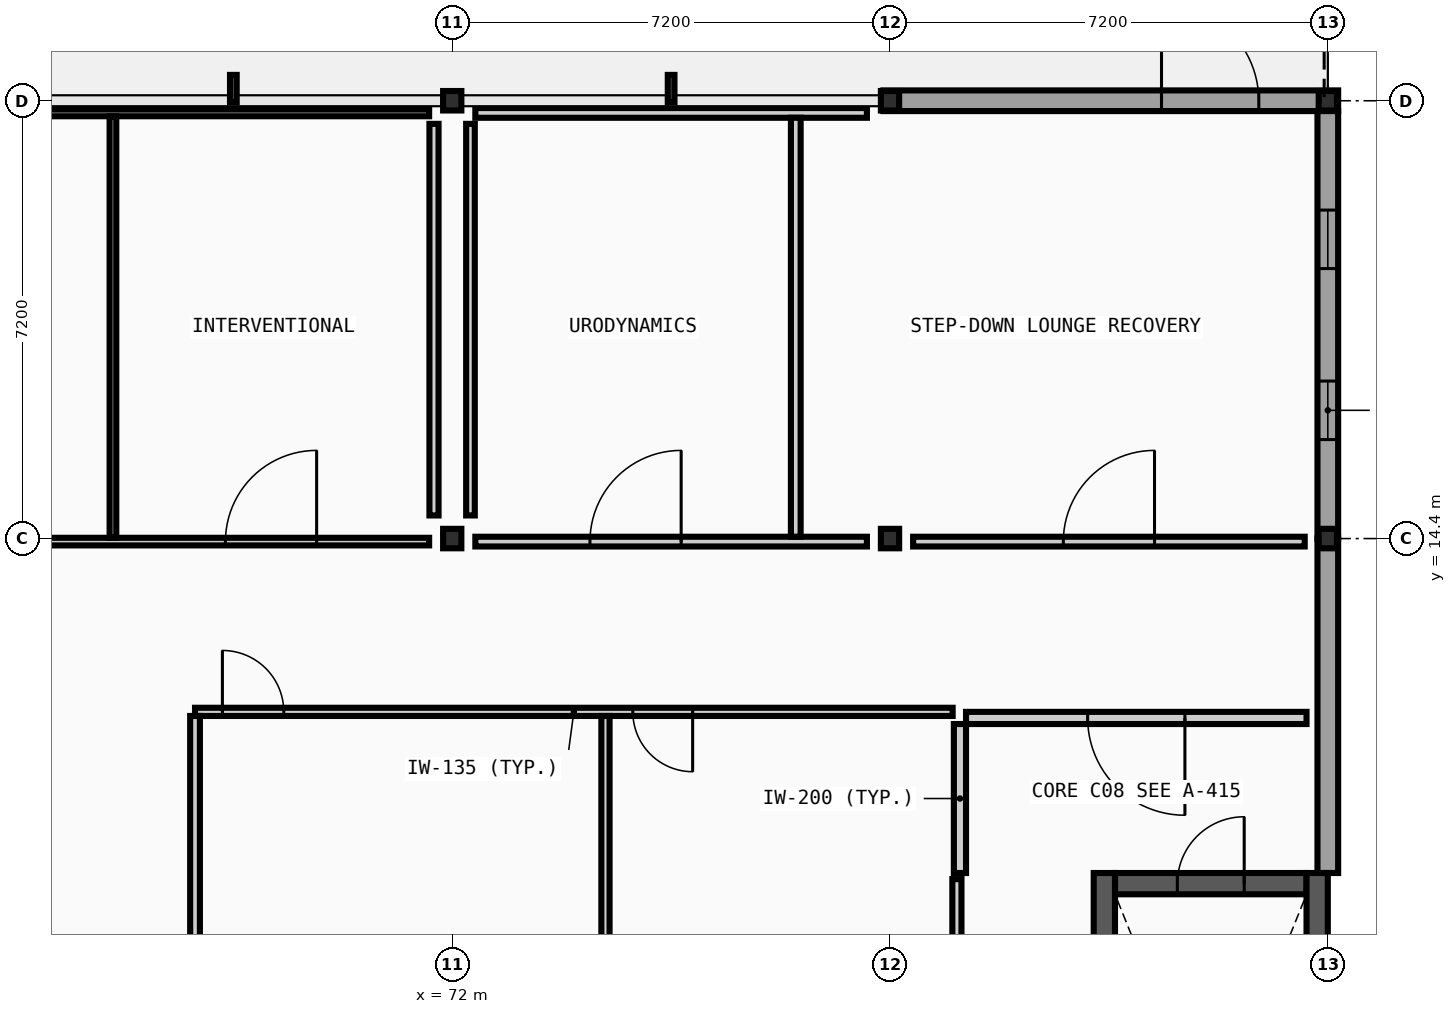
"""IFC4 building model, lengths in metres.
Left out: names, types, materials, properties, quantities, classifications, styles, units other than length and angle.
Written with IfcOpenShell. Run it as: python <this file> out.ifc"""

import sys

from ifc_helpers import new_model, si_unit, direction, frame, frame_2d, origin, origin_2d, place, context, subcontext, project, spatial, rectangle, i_section, extrude, element, fill, save


model = new_model("IFC4")
c1 = context("Model", 3, precision=1e-05, world=origin(), true_north=direction((0.0, 1.0)))
c2 = subcontext(c1, "Body", "Model", "MODEL_VIEW")
j1 = project(units=[si_unit("LENGTHUNIT", "METRE"), si_unit("PLANEANGLEUNIT", "RADIAN")], contexts=[c1])
p1 = place(None, origin())
s1 = spatial("IfcSite", under=j1, at=p1, CompositionType="ELEMENT")
p2 = place(p1, origin())
s2 = spatial("IfcBuilding", under=s1, at=p2, CompositionType="ELEMENT")
p3 = place(p2, frame((0.0, 0.0, 14.0)))
s3 = spatial("IfcBuildingStorey", under=s2, at=p3, CompositionType="ELEMENT", Elevation=14.0)
for number, where, z_axis, x_axis in (
    (1, (72.0, 14.4, 0.0), (0.0, 0.0, 1.0), (1.0, 0.0, 0.0)),
    (2, (72.0, 21.6, 0.0), (0.0, 0.0, 1.0), (1.0, 0.0, 0.0)),
    (3, (79.2, 14.4, 0.0), (0.0, 0.0, 1.0), (1.0, 0.0, 0.0)),
    (4, (79.2, 21.6, 0.0), (0.0, 0.0, 1.0), (1.0, 0.0, 0.0)),
    (5, (86.4, 14.4, 0.0), (0.0, 0.0, 1.0), (1.0, 0.0, 0.0)),
    (6, (86.4, 21.6, 0.0), (0.0, 0.0, 1.0), (1.0, 0.0, 0.0)),
):
    element("IfcColumn", number, at=place(p3, frame(where, z_axis=z_axis, x_axis=x_axis)), inside=s3, PredefinedType="COLUMN", context=c2, shape_type="SweptSolid", body=[
        extrude(i_section(OverallWidth=0.3, OverallDepth=0.32, WebThickness=0.011, FlangeThickness=0.021, FilletRadius=0.027, at=origin_2d()), origin(), (0.0, 0.0, 1.0), 4.4),
    ])
p4 = place(p3, frame((86.57, 21.6, 0.0), z_axis=(0.0, 0.0, 1.0), x_axis=(-1.0, 0.0, 0.0)))
e7 = element("IfcWall", 7, at=p4, inside=s3, PredefinedType="STANDARD", context=c2, shape_type="SweptSolid", body=[
    extrude(rectangle(XDim=7.48, YDim=0.34, at=frame_2d((3.74, 0.0))), origin(), (0.0, 0.0, 1.0), 3.935),
])
p5 = place(p4, frame((1.305, 0.0, 0.0)))
e8 = element("IfcOpeningElement", 8, at=p5, cuts=e7, PredefinedType="OPENING", context=c2, shape_type="SweptSolid", body=[
    extrude(rectangle(XDim=1.6, YDim=2.2, at=frame_2d((0.8, 1.1))), frame((0.0, 0.18, 0.0), z_axis=(0.0, -1.0, 0.0), x_axis=(1.0, 0.0, 0.0)), (0.0, 0.0, 1.0), 0.36),
])
p6 = place(p3, frame((86.4, 8.9, 0.0), z_axis=(0.0, 0.0, 1.0), x_axis=(0.0, 1.0, 0.0)))
e9 = element("IfcWall", 9, at=p6, inside=s3, PredefinedType="STANDARD", context=c2, shape_type="SweptSolid", body=[
    extrude(rectangle(XDim=5.5, YDim=0.34, at=frame_2d((2.75, 0.0))), origin(), (0.0, 0.0, 1.0), 4.2),
])
p7 = place(p3, frame((86.4, 14.4, 0.0), z_axis=(0.0, 0.0, 1.0), x_axis=(0.0, 1.0, 0.0)))
e10 = element("IfcWall", 10, at=p7, inside=s3, PredefinedType="STANDARD", context=c2, shape_type="SweptSolid", body=[
    extrude(rectangle(XDim=7.03, YDim=0.34, at=frame_2d((3.515, 0.0))), origin(), (0.0, 0.0, 1.0), 3.885),
])
p8 = place(p7, frame((1.628, 0.0, 0.95)))
e11 = element("IfcOpeningElement", 11, at=p8, cuts=e10, PredefinedType="OPENING", context=c2, shape_type="SweptSolid", body=[
    extrude(rectangle(XDim=0.962, YDim=1.368, at=frame_2d((0.481, 0.684))), frame((0.0, 0.18, 0.0), z_axis=(0.0, -1.0, 0.0), x_axis=(1.0, 0.0, 0.0)), (0.0, 0.0, 1.0), 0.36),
])
p9 = place(p7, frame((4.44, 0.0, 0.95)))
e12 = element("IfcOpeningElement", 12, at=p9, cuts=e10, PredefinedType="OPENING", context=c2, shape_type="SweptSolid", body=[
    extrude(rectangle(XDim=0.962, YDim=1.368, at=frame_2d((0.481, 0.684))), frame((0.0, 0.18, 0.0), z_axis=(0.0, -1.0, 0.0), x_axis=(1.0, 0.0, 0.0)), (0.0, 0.0, 1.0), 0.36),
])
p10 = place(p3, frame((82.9, 8.725, 0.0), z_axis=(0.0, 0.0, 1.0), x_axis=(1.0, 0.0, 0.0)))
e13 = element("IfcWall", 13, at=p10, inside=s3, PredefinedType="SHEAR", context=c2, shape_type="SweptSolid", body=[
    extrude(rectangle(XDim=3.15, YDim=0.35, at=frame_2d((1.575, 0.0))), origin(), (0.0, 0.0, 1.0), 4.2),
])
p11 = place(p10, frame((1.025, 0.0, 0.0)))
e14 = element("IfcOpeningElement", 14, at=p11, cuts=e13, PredefinedType="OPENING", context=c2, shape_type="SweptSolid", body=[
    extrude(rectangle(XDim=1.1, YDim=2.15, at=frame_2d((0.55, 1.075))), frame((0.0, 0.185, 0.0), z_axis=(0.0, -1.0, 0.0), x_axis=(1.0, 0.0, 0.0)), (0.0, 0.0, 1.0), 0.37),
])
for number, where, z_axis, x_axis in (
    (15, (82.725, 0.17, 0.0), (0.0, 0.0, 1.0), (0.0, 1.0, 0.0)),
    (16, (86.225, 0.17, 0.0), (0.0, 0.0, 1.0), (0.0, 1.0, 0.0)),
):
    element("IfcWall", number, at=place(p3, frame(where, z_axis=z_axis, x_axis=x_axis)), inside=s3, PredefinedType="SHEAR", context=c2, shape_type="SweptSolid", body=[
        extrude(rectangle(XDim=8.73, YDim=0.35, at=frame_2d((4.365, 0.0))), origin(), (0.0, 0.0, 1.0), 4.2),
    ])
p12 = place(p3, frame((80.45, 11.45, 0.0), z_axis=(0.0, 0.0, 1.0), x_axis=(1.0, 0.0, 0.0)))
e17 = element("IfcWall", 17, at=p12, inside=s3, PredefinedType="PARTITIONING", context=c2, shape_type="SweptSolid", body=[
    extrude(rectangle(XDim=5.6, YDim=0.2, at=frame_2d((2.8, 0.0))), origin(), (0.0, 0.0, 1.0), 4.2),
])
p13 = place(p12, frame((2.0, 0.0, 0.0)))
e18 = element("IfcOpeningElement", 18, at=p13, cuts=e17, PredefinedType="OPENING", context=c2, shape_type="SweptSolid", body=[
    extrude(rectangle(XDim=1.6, YDim=2.2, at=frame_2d((0.8, 1.1))), frame((0.0, 0.11, 0.0), z_axis=(0.0, -1.0, 0.0), x_axis=(1.0, 0.0, 0.0)), (0.0, 0.0, 1.0), 0.22),
])
p14 = place(p3, frame((80.35, 8.9, 0.0), z_axis=(0.0, 0.0, 1.0), x_axis=(0.0, 1.0, 0.0)))
e19 = element("IfcWall", 19, at=p14, inside=s3, PredefinedType="PARTITIONING", context=c2, shape_type="SweptSolid", body=[
    extrude(rectangle(XDim=2.45, YDim=0.2, at=frame_2d((1.225, 0.0))), origin(), (0.0, 0.0, 1.0), 4.2),
])
p15 = place(p3, frame((67.77, 11.55, 0.0), z_axis=(0.0, 0.0, 1.0), x_axis=(1.0, 0.0, 0.0)))
e20 = element("IfcWall", 20, at=p15, inside=s3, PredefinedType="PARTITIONING", context=c2, shape_type="SweptSolid", body=[
    extrude(rectangle(XDim=12.46, YDim=0.135, at=frame_2d((6.23, 0.0))), origin(), (0.0, 0.0, 1.0), 4.2),
])
p16 = place(p15, frame((7.2, 0.0, 0.0)))
e21 = element("IfcOpeningElement", 21, at=p16, cuts=e20, PredefinedType="OPENING", context=c2, shape_type="SweptSolid", body=[
    extrude(rectangle(XDim=0.984, YDim=2.04, at=frame_2d((0.492, 1.02))), frame((0.0, 0.078, 0.0), z_axis=(0.0, -1.0, 0.0), x_axis=(1.0, 0.0, 0.0)), (0.0, 0.0, 1.0), 0.155),
])
p17 = place(p15, frame((0.45, 0.0, 0.0)))
e22 = element("IfcOpeningElement", 22, at=p17, cuts=e20, PredefinedType="OPENING", context=c2, shape_type="SweptSolid", body=[
    extrude(rectangle(XDim=1.01, YDim=2.04, at=frame_2d((0.505, 1.02))), frame((0.0, 0.078, 0.0), z_axis=(0.0, -1.0, 0.0), x_axis=(1.0, 0.0, 0.0)), (0.0, 0.0, 1.0), 0.155),
])
p18 = place(p3, frame((65.18, 14.35, 0.0), z_axis=(0.0, 0.0, 1.0), x_axis=(1.0, 0.0, 0.0)))
e23 = element("IfcWall", 23, at=p18, inside=s3, PredefinedType="PARTITIONING", context=c2, shape_type="SweptSolid", body=[
    extrude(rectangle(XDim=6.44, YDim=0.125, at=frame_2d((3.22, 0.0))), origin(), (0.0, 0.0, 1.0), 3.935),
])
p19 = place(p18, frame((3.09, 0.0, 0.0)))
e24 = element("IfcOpeningElement", 24, at=p19, cuts=e23, PredefinedType="OPENING", context=c2, shape_type="SweptSolid", body=[
    extrude(rectangle(XDim=1.5, YDim=2.2, at=frame_2d((0.75, 1.1))), frame((0.0, 0.073, 0.0), z_axis=(0.0, -1.0, 0.0), x_axis=(1.0, 0.0, 0.0)), (0.0, 0.0, 1.0), 0.145),
])
p20 = place(p3, frame((72.38, 14.35, 0.0), z_axis=(0.0, 0.0, 1.0), x_axis=(1.0, 0.0, 0.0)))
e25 = element("IfcWall", 25, at=p20, inside=s3, PredefinedType="PARTITIONING", context=c2, shape_type="SweptSolid", body=[
    extrude(rectangle(XDim=6.44, YDim=0.16, at=frame_2d((3.22, 0.0))), origin(), (0.0, 0.0, 1.0), 3.935),
])
p21 = place(p20, frame((1.885, 0.0, 0.0)))
e26 = element("IfcOpeningElement", 26, at=p21, cuts=e25, PredefinedType="OPENING", context=c2, shape_type="SweptSolid", body=[
    extrude(rectangle(XDim=1.5, YDim=2.2, at=frame_2d((0.75, 1.1))), frame((0.0, 0.09, 0.0), z_axis=(0.0, -1.0, 0.0), x_axis=(1.0, 0.0, 0.0)), (0.0, 0.0, 1.0), 0.18),
])
p22 = place(p3, frame((79.58, 14.35, 0.0), z_axis=(0.0, 0.0, 1.0), x_axis=(1.0, 0.0, 0.0)))
e27 = element("IfcWall", 27, at=p22, inside=s3, PredefinedType="PARTITIONING", context=c2, shape_type="SweptSolid", body=[
    extrude(rectangle(XDim=6.44, YDim=0.16, at=frame_2d((3.22, 0.0))), origin(), (0.0, 0.0, 1.0), 3.935),
])
p23 = place(p22, frame((2.47, 0.0, 0.0)))
e28 = element("IfcOpeningElement", 28, at=p23, cuts=e27, PredefinedType="OPENING", context=c2, shape_type="SweptSolid", body=[
    extrude(rectangle(XDim=1.5, YDim=2.2, at=frame_2d((0.75, 1.1))), frame((0.0, 0.09, 0.0), z_axis=(0.0, -1.0, 0.0), x_axis=(1.0, 0.0, 0.0)), (0.0, 0.0, 1.0), 0.18),
])
p24 = place(p3, frame((65.18, 21.4, 0.0), z_axis=(0.0, 0.0, 1.0), x_axis=(1.0, 0.0, 0.0)))
e29 = element("IfcWall", 29, at=p24, inside=s3, PredefinedType="PARTITIONING", context=c2, shape_type="SweptSolid", body=[
    extrude(rectangle(XDim=6.44, YDim=0.11, at=frame_2d((3.22, 0.0))), origin(), (0.0, 0.0, 1.0), 3.935),
])
p25 = place(p3, frame((72.38, 21.4, 0.0), z_axis=(0.0, 0.0, 1.0), x_axis=(1.0, 0.0, 0.0)))
e30 = element("IfcWall", 30, at=p25, inside=s3, PredefinedType="PARTITIONING", context=c2, shape_type="SweptSolid", body=[
    extrude(rectangle(XDim=6.44, YDim=0.16, at=frame_2d((3.22, 0.0))), origin(), (0.0, 0.0, 1.0), 3.935),
])
p26 = place(p3, frame((66.42, 14.413, 0.0), z_axis=(0.0, 0.0, 1.0), x_axis=(0.0, 1.0, 0.0)))
e31 = element("IfcWall", 31, at=p26, inside=s3, PredefinedType="PARTITIONING", context=c2, shape_type="SweptSolid", body=[
    extrude(rectangle(XDim=6.932, YDim=0.11, at=frame_2d((3.466, 0.0))), origin(), (0.0, 0.0, 1.0), 4.2),
])
p27 = place(p3, frame((67.77, 3.36, 0.0), z_axis=(0.0, 0.0, 1.0), x_axis=(0.0, 1.0, 0.0)))
e32 = element("IfcWall", 32, at=p27, inside=s3, PredefinedType="PARTITIONING", context=c2, shape_type="SweptSolid", body=[
    extrude(rectangle(XDim=8.122, YDim=0.16, at=frame_2d((4.061, 0.0))), origin(), (0.0, 0.0, 1.0), 4.2),
])
p28 = place(p3, frame((71.7, 14.78, 0.0), z_axis=(0.0, 0.0, 1.0), x_axis=(0.0, 1.0, 0.0)))
e33 = element("IfcWall", 33, at=p28, inside=s3, PredefinedType="PARTITIONING", context=c2, shape_type="SweptSolid", body=[
    extrude(rectangle(XDim=6.44, YDim=0.15, at=frame_2d((3.22, 0.0))), origin(), (0.0, 0.0, 1.0), 3.895),
])
p29 = place(p3, frame((72.3, 14.78, 0.0), z_axis=(0.0, 0.0, 1.0), x_axis=(0.0, 1.0, 0.0)))
e34 = element("IfcWall", 34, at=p29, inside=s3, PredefinedType="PARTITIONING", context=c2, shape_type="SweptSolid", body=[
    extrude(rectangle(XDim=6.44, YDim=0.142, at=frame_2d((3.22, 0.0))), origin(), (0.0, 0.0, 1.0), 3.895),
])
p30 = place(p3, frame((74.52, 0.2, 0.0), z_axis=(0.0, 0.0, 1.0), x_axis=(0.0, 1.0, 0.0)))
e35 = element("IfcWall", 35, at=p30, inside=s3, PredefinedType="PARTITIONING", context=c2, shape_type="SweptSolid", body=[
    extrude(rectangle(XDim=11.282, YDim=0.135, at=frame_2d((5.641, 0.0))), origin(), (0.0, 0.0, 1.0), 3.945),
])
p31 = place(p3, frame((77.65, 14.43, 0.0), z_axis=(0.0, 0.0, 1.0), x_axis=(0.0, 1.0, 0.0)))
e36 = element("IfcWall", 36, at=p31, inside=s3, PredefinedType="PARTITIONING", context=c2, shape_type="SweptSolid", body=[
    extrude(rectangle(XDim=6.89, YDim=0.16, at=frame_2d((3.445, 0.0))), origin(), (0.0, 0.0, 1.0), 4.2),
])
p32 = place(p3, frame((80.3, 0.2, 0.0), z_axis=(0.0, 0.0, 1.0), x_axis=(0.0, 1.0, 0.0)))
e37 = element("IfcWall", 37, at=p32, inside=s3, PredefinedType="PARTITIONING", context=c2, shape_type="SweptSolid", body=[
    extrude(rectangle(XDim=8.6, YDim=0.15, at=frame_2d((4.3, 0.0))), origin(), (0.0, 0.0, 1.0), 4.2),
])
p33 = place(p8, origin())
e38 = element("IfcWindow", 38, at=p33, inside=s3, PartitioningType="SINGLE_PANEL", PredefinedType="WINDOW", context=c2, shape_type="SweptSolid", body=[
    extrude(rectangle(XDim=0.962, YDim=1.368, at=frame_2d((0.481, 0.684))), frame((0.0, 0.03, 0.0), z_axis=(0.0, -1.0, 0.0), x_axis=(1.0, 0.0, 0.0)), (0.0, 0.0, 1.0), 0.06),
])
fill(e11, e38)
p34 = place(p9, origin())
e39 = element("IfcWindow", 39, at=p34, inside=s3, PartitioningType="SINGLE_PANEL", PredefinedType="WINDOW", context=c2, shape_type="SweptSolid", body=[
    extrude(rectangle(XDim=0.962, YDim=1.368, at=frame_2d((0.481, 0.684))), frame((0.0, 0.03, 0.0), z_axis=(0.0, -1.0, 0.0), x_axis=(1.0, 0.0, 0.0)), (0.0, 0.0, 1.0), 0.06),
])
fill(e12, e39)
p35 = place(p5, origin())
e40 = element("IfcDoor", 40, at=p35, inside=s3, OperationType="DOUBLE_DOOR_SINGLE_SWING", PredefinedType="DOOR", context=c2, shape_type="SweptSolid", body=[
    extrude(rectangle(XDim=1.6, YDim=2.2, at=frame_2d((0.8, 1.1))), frame((0.0, 0.025, 0.0), z_axis=(0.0, -1.0, 0.0), x_axis=(1.0, 0.0, 0.0)), (0.0, 0.0, 1.0), 0.05),
])
fill(e8, e40)
p36 = place(p11, frame((1.1, 0.0, 0.0), z_axis=(0.0, 0.0, 1.0), x_axis=(-1.0, 0.0, 0.0)))
e41 = element("IfcDoor", 41, at=p36, inside=s3, OperationType="SINGLE_SWING_RIGHT", PredefinedType="DOOR", context=c2, shape_type="SweptSolid", body=[
    extrude(rectangle(XDim=1.1, YDim=2.15, at=frame_2d((0.55, 1.075))), frame((0.0, 0.025, 0.0), z_axis=(0.0, -1.0, 0.0), x_axis=(1.0, 0.0, 0.0)), (0.0, 0.0, 1.0), 0.05),
])
fill(e14, e41)
p37 = place(p13, origin())
e42 = element("IfcDoor", 42, at=p37, inside=s3, OperationType="DOUBLE_DOOR_SINGLE_SWING", PredefinedType="DOOR", context=c2, shape_type="SweptSolid", body=[
    extrude(rectangle(XDim=1.6, YDim=2.2, at=frame_2d((0.8, 1.1))), frame((0.0, 0.025, 0.0), z_axis=(0.0, -1.0, 0.0), x_axis=(1.0, 0.0, 0.0)), (0.0, 0.0, 1.0), 0.05),
])
fill(e18, e42)
p38 = place(p19, frame((1.5, 0.0, 0.0), z_axis=(0.0, 0.0, 1.0), x_axis=(-1.0, 0.0, 0.0)))
e43 = element("IfcDoor", 43, at=p38, inside=s3, OperationType="DOUBLE_DOOR_SINGLE_SWING", PredefinedType="DOOR", context=c2, shape_type="SweptSolid", body=[
    extrude(rectangle(XDim=1.5, YDim=2.2, at=frame_2d((0.75, 1.1))), frame((0.0, 0.025, 0.0), z_axis=(0.0, -1.0, 0.0), x_axis=(1.0, 0.0, 0.0)), (0.0, 0.0, 1.0), 0.05),
])
fill(e24, e43)
p39 = place(p21, frame((1.5, 0.0, 0.0), z_axis=(0.0, 0.0, 1.0), x_axis=(-1.0, 0.0, 0.0)))
e44 = element("IfcDoor", 44, at=p39, inside=s3, OperationType="DOUBLE_DOOR_SINGLE_SWING", PredefinedType="DOOR", context=c2, shape_type="SweptSolid", body=[
    extrude(rectangle(XDim=1.5, YDim=2.2, at=frame_2d((0.75, 1.1))), frame((0.0, 0.025, 0.0), z_axis=(0.0, -1.0, 0.0), x_axis=(1.0, 0.0, 0.0)), (0.0, 0.0, 1.0), 0.05),
])
fill(e26, e44)
p40 = place(p23, frame((1.5, 0.0, 0.0), z_axis=(0.0, 0.0, 1.0), x_axis=(-1.0, 0.0, 0.0)))
e45 = element("IfcDoor", 45, at=p40, inside=s3, OperationType="DOUBLE_DOOR_SINGLE_SWING", PredefinedType="DOOR", context=c2, shape_type="SweptSolid", body=[
    extrude(rectangle(XDim=1.5, YDim=2.2, at=frame_2d((0.75, 1.1))), frame((0.0, 0.025, 0.0), z_axis=(0.0, -1.0, 0.0), x_axis=(1.0, 0.0, 0.0)), (0.0, 0.0, 1.0), 0.05),
])
fill(e28, e45)
p41 = place(p16, origin())
e46 = element("IfcDoor", 46, at=p41, inside=s3, OperationType="SINGLE_SWING_RIGHT", PredefinedType="DOOR", context=c2, shape_type="SweptSolid", body=[
    extrude(rectangle(XDim=0.984, YDim=2.04, at=frame_2d((0.492, 1.02))), frame((0.0, 0.025, 0.0), z_axis=(0.0, -1.0, 0.0), x_axis=(1.0, 0.0, 0.0)), (0.0, 0.0, 1.0), 0.05),
])
fill(e21, e46)
p42 = place(p17, origin())
e47 = element("IfcDoor", 47, at=p42, inside=s3, OperationType="SINGLE_SWING_LEFT", PredefinedType="DOOR", context=c2, shape_type="SweptSolid", body=[
    extrude(rectangle(XDim=1.01, YDim=2.04, at=frame_2d((0.505, 1.02))), frame((0.0, 0.025, 0.0), z_axis=(0.0, -1.0, 0.0), x_axis=(1.0, 0.0, 0.0)), (0.0, 0.0, 1.0), 0.05),
])
fill(e22, e47)
save(model, sys.argv[1])
